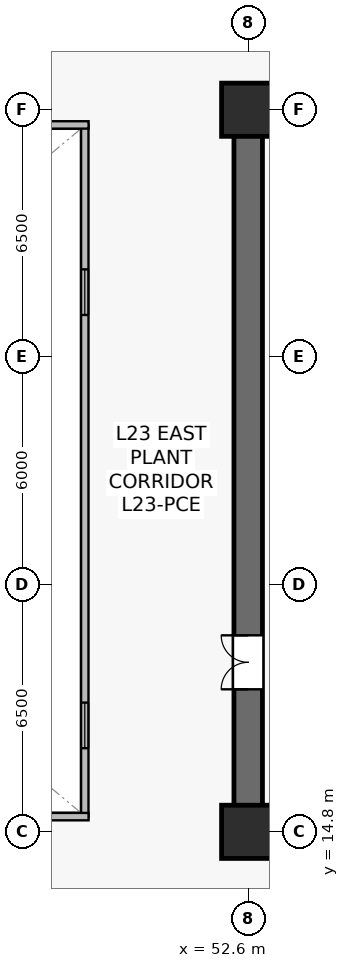
"""IFC4 building model, lengths in metres.
Left out: names, types, materials, properties, quantities, classifications, styles, units other than length and angle.
Written with IfcOpenShell. Run it as: python <this file> out.ifc"""

import sys

from ifc_helpers import new_model, si_unit, direction, frame, frame_2d, origin, origin_2d, place, context, subcontext, project, spatial, rectangle, extrude, source, transform, mapped, element, fill, save


model = new_model("IFC4")
c1 = context("Model", 3, precision=1e-05, world=origin(), true_north=direction((0.0, 1.0)))
c2 = subcontext(c1, "Body", "Model", "MODEL_VIEW")
j1 = project(units=[si_unit("LENGTHUNIT", "METRE"), si_unit("PLANEANGLEUNIT", "RADIAN")], contexts=[c1])
p1 = place(None, origin())
s1 = spatial("IfcSite", under=j1, at=p1, CompositionType="ELEMENT")
p2 = place(p1, origin())
s2 = spatial("IfcBuilding", under=s1, at=p2, CompositionType="ELEMENT")
p3 = place(p2, frame((0.0, 0.0, 94.9)))
s3 = spatial("IfcBuildingStorey", under=s2, at=p3, CompositionType="ELEMENT", Elevation=94.9)
p4 = place(p3, frame((52.225, 14.8, 0.0), z_axis=(0.0, 0.0, 1.0), x_axis=(1.0, 0.0, 0.0)))
e1 = element("IfcWall", 1, at=p4, inside=s3, PredefinedType="SHEAR", context=c2, shape_type="SweptSolid", body=[
    extrude(rectangle(XDim=15.55, YDim=0.75, at=frame_2d((7.775, 0.0))), origin(), (0.0, 0.0, 1.0), 5.09),
])
p5 = place(p3, frame((52.225, 33.8, 0.0), z_axis=(0.0, 0.0, 1.0), x_axis=(1.0, 0.0, 0.0)))
e2 = element("IfcWall", 2, at=p5, inside=s3, PredefinedType="SHEAR", context=c2, shape_type="SweptSolid", body=[
    extrude(rectangle(XDim=15.55, YDim=0.75, at=frame_2d((7.775, 0.0))), origin(), (0.0, 0.0, 1.0), 5.09),
])
p6 = place(p5, frame((8.875, 0.0, 0.0)))
e3 = element("IfcOpeningElement", 3, at=p6, cuts=e2, PredefinedType="OPENING", context=c2, shape_type="SweptSolid", body=[
    extrude(rectangle(XDim=0.95, YDim=2.15, at=frame_2d((0.475, 1.075))), frame((0.0, 0.385, 0.0), z_axis=(0.0, -1.0, 0.0), x_axis=(1.0, 0.0, 0.0)), (0.0, 0.0, 1.0), 0.77),
])
p7 = place(p5, frame((5.51, 0.0, 0.0)))
e4 = element("IfcOpeningElement", 4, at=p7, cuts=e2, PredefinedType="OPENING", context=c2, shape_type="SweptSolid", body=[
    extrude(rectangle(XDim=0.95, YDim=2.15, at=frame_2d((0.475, 1.075))), frame((0.0, 0.385, 0.0), z_axis=(0.0, -1.0, 0.0), x_axis=(1.0, 0.0, 0.0)), (0.0, 0.0, 1.0), 0.77),
])
p8 = place(p5, frame((2.11, 0.0, 0.0)))
e5 = element("IfcOpeningElement", 5, at=p8, cuts=e2, PredefinedType="OPENING", context=c2, shape_type="SweptSolid", body=[
    extrude(rectangle(XDim=0.95, YDim=2.15, at=frame_2d((0.475, 1.075))), frame((0.0, 0.385, 0.0), z_axis=(0.0, -1.0, 0.0), x_axis=(1.0, 0.0, 0.0)), (0.0, 0.0, 1.0), 0.77),
])
p9 = place(p3, frame((52.6, 15.175, 0.0), z_axis=(0.0, 0.0, 1.0), x_axis=(0.0, 1.0, 0.0)))
e6 = element("IfcWall", 6, at=p9, inside=s3, PredefinedType="SHEAR", context=c2, shape_type="SweptSolid", body=[
    extrude(rectangle(XDim=18.25, YDim=0.75, at=frame_2d((9.125, 0.0))), origin(), (0.0, 0.0, 1.0), 5.09),
])
p10 = place(p9, frame((3.375, 0.0, 0.0)))
e7 = element("IfcOpeningElement", 7, at=p10, cuts=e6, PredefinedType="OPENING", context=c2, shape_type="SweptSolid", body=[
    extrude(rectangle(XDim=1.42, YDim=2.2, at=frame_2d((0.71, 1.1))), frame((0.0, 0.385, 0.0), z_axis=(0.0, -1.0, 0.0), x_axis=(1.0, 0.0, 0.0)), (0.0, 0.0, 1.0), 0.77),
])
m1 = source(origin(), c2, "Body", "SweptSolid", [
    extrude(rectangle(XDim=1.4, YDim=1.4, at=origin_2d()), origin(), (0.0, 0.0, 1.0), 5.4),
])
for number, where, z_axis, x_axis in (
    (8, (52.6, 14.8, 0.0), (0.0, 0.0, 1.0), (1.0, 0.0, 0.0)),
    (9, (52.6, 33.8, 0.0), (0.0, 0.0, 1.0), (1.0, 0.0, 0.0)),
):
    element("IfcColumn", number, at=place(p3, frame(where, z_axis=z_axis, x_axis=x_axis)), inside=s3, PredefinedType="COLUMN", context=c2, shape_type="MappedRepresentation", body=[
        mapped(m1, transform((0.0, 0.0, 0.0), scale=1.0)),
    ])
p11 = place(p3, frame((48.3, 15.2, 0.0), z_axis=(0.0, 0.0, 1.0), x_axis=(0.0, 1.0, 0.0)))
e10 = element("IfcWall", 10, at=p11, inside=s3, PredefinedType="SOLIDWALL", context=c2, shape_type="SweptSolid", body=[
    extrude(rectangle(XDim=18.2, YDim=0.195, at=frame_2d((9.1, 0.0))), origin(), (0.0, 0.0, 1.0), 5.09),
])
p12 = place(p11, frame((1.8, 0.0, 0.9)))
e11 = element("IfcOpeningElement", 11, at=p12, cuts=e10, PredefinedType="OPENING", context=c2, shape_type="SweptSolid", body=[
    extrude(rectangle(XDim=1.2, YDim=1.35, at=frame_2d((0.6, 0.675))), frame((0.0, 0.107, 0.0), z_axis=(0.0, -1.0, 0.0), x_axis=(1.0, 0.0, 0.0)), (0.0, 0.0, 1.0), 0.215),
])
p13 = place(p11, frame((13.2, 0.0, 0.9)))
e12 = element("IfcOpeningElement", 12, at=p13, cuts=e10, PredefinedType="OPENING", context=c2, shape_type="SweptSolid", body=[
    extrude(rectangle(XDim=1.2, YDim=1.35, at=frame_2d((0.6, 0.675))), frame((0.0, 0.107, 0.0), z_axis=(0.0, -1.0, 0.0), x_axis=(1.0, 0.0, 0.0)), (0.0, 0.0, 1.0), 0.215),
])
for number, where, z_axis, x_axis in (
    (13, (26.4, 15.2, 0.0), (0.0, 0.0, 1.0), (1.0, 0.0, 0.0)),
    (14, (26.4, 33.4, 0.0), (0.0, 0.0, 1.0), (1.0, 0.0, 0.0)),
):
    element("IfcWall", number, at=place(p3, frame(where, z_axis=z_axis, x_axis=x_axis)), inside=s3, PredefinedType="SOLIDWALL", context=c2, shape_type="SweptSolid", body=[
        extrude(rectangle(XDim=22.0, YDim=0.195, at=frame_2d((11.0, 0.0))), origin(), (0.0, 0.0, 1.0), 5.09),
    ])
m2 = source(origin(), c2, "Body", "SweptSolid", [
    extrude(rectangle(XDim=1.2, YDim=1.35, at=frame_2d((0.6, 0.675))), frame((0.0, 0.03, 0.0), z_axis=(0.0, -1.0, 0.0), x_axis=(1.0, 0.0, 0.0)), (0.0, 0.0, 1.0), 0.06),
])
p14 = place(p12, origin())
e15 = element("IfcWindow", 15, at=p14, inside=s3, PartitioningType="SINGLE_PANEL", PredefinedType="WINDOW", context=c2, shape_type="MappedRepresentation", body=[
    mapped(m2, transform((0.0, 0.0, 0.0), scale=1.0)),
])
fill(e11, e15)
p15 = place(p13, origin())
e16 = element("IfcWindow", 16, at=p15, inside=s3, PartitioningType="SINGLE_PANEL", PredefinedType="WINDOW", context=c2, shape_type="MappedRepresentation", body=[
    mapped(m2, transform((0.0, 0.0, 0.0), scale=1.0)),
])
fill(e12, e16)
m3 = source(origin(), c2, "Body", "SweptSolid", [
    extrude(rectangle(XDim=1.42, YDim=2.2, at=frame_2d((0.71, 1.1))), frame((0.0, 0.025, 0.0), z_axis=(0.0, -1.0, 0.0), x_axis=(1.0, 0.0, 0.0)), (0.0, 0.0, 1.0), 0.05),
])
p16 = place(p10, origin())
e17 = element("IfcDoor", 17, at=p16, inside=s3, OperationType="DOUBLE_DOOR_SINGLE_SWING", PredefinedType="DOOR", context=c2, shape_type="MappedRepresentation", body=[
    mapped(m3, transform((0.0, 0.0, 0.0), scale=1.0)),
])
fill(e7, e17)
save(model, sys.argv[1])
